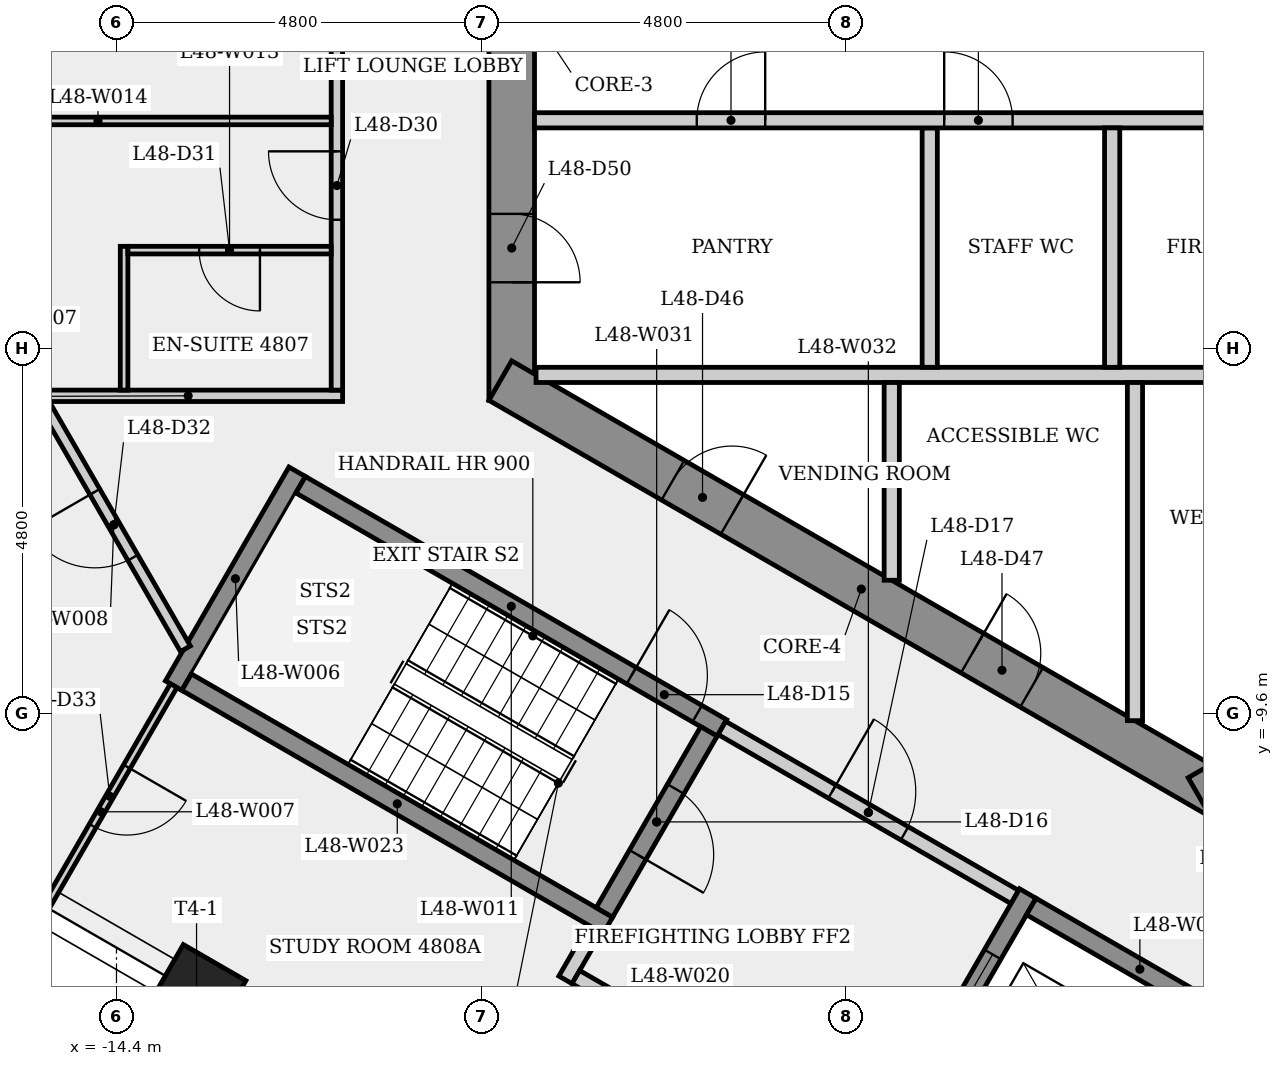
"""IFC4 building model, lengths in metres.
Left out: names, types, materials, properties, quantities, classifications, styles, units other than length and angle.
Written with IfcOpenShell. Run it as: python <this file> out.ifc"""

import sys

from ifc_helpers import new_model, si_unit, direction, frame, frame_2d, origin, origin_2d, place, context, subcontext, project, spatial, rectangle, extrude, element, fill, save


model = new_model("IFC4")
c1 = context("Model", 3, precision=1e-05, world=origin(), true_north=direction((0.0, 1.0)))
c2 = subcontext(c1, "Body", "Model", "MODEL_VIEW")
j1 = project(units=[si_unit("LENGTHUNIT", "METRE"), si_unit("PLANEANGLEUNIT", "RADIAN")], contexts=[c1])
p1 = place(None, origin())
s1 = spatial("IfcSite", under=j1, at=p1, CompositionType="ELEMENT")
p2 = place(p1, origin())
s2 = spatial("IfcBuilding", under=s1, at=p2, CompositionType="ELEMENT")
p3 = place(p2, frame((0.0, 0.0, 179.9)))
s3 = spatial("IfcBuildingStorey", under=s2, at=p3, CompositionType="ELEMENT", Elevation=179.9)
p4 = place(p3, frame((-9.2, 5.485, 0.0), z_axis=(0.0, 0.0, 1.0), x_axis=(0.0, -1.0, 0.0)))
e1 = element("IfcWall", 1, at=p4, inside=s3, PredefinedType="SHEAR", context=c2, shape_type="SweptSolid", body=[
    extrude(rectangle(XDim=10.97, YDim=0.6, at=frame_2d((5.485, 0.0))), origin(), (0.0, 0.0, 1.0), 3.4),
])
p5 = place(p4, frame((8.516, 0.0, 0.0)))
e2 = element("IfcOpeningElement", 2, at=p5, cuts=e1, PredefinedType="OPENING", context=c2, shape_type="SweptSolid", body=[
    extrude(rectangle(XDim=0.9, YDim=2.1, at=frame_2d((0.45, 1.05))), frame((0.0, 0.31, 0.0), z_axis=(0.0, -1.0, 0.0), x_axis=(1.0, 0.0, 0.0)), (0.0, 0.0, 1.0), 0.62),
])
p6 = place(p4, frame((4.685, 0.0, 0.0)))
e3 = element("IfcOpeningElement", 3, at=p6, cuts=e1, PredefinedType="OPENING", context=c2, shape_type="SweptSolid", body=[
    extrude(rectangle(XDim=1.6, YDim=2.1, at=frame_2d((0.8, 1.05))), frame((0.0, 0.31, 0.0), z_axis=(0.0, -1.0, 0.0), x_axis=(1.0, 0.0, 0.0)), (0.0, 0.0, 1.0), 0.62),
])
p7 = place(p3, frame((-9.35, -5.225, 0.0), z_axis=(0.0, 0.0, 1.0), x_axis=(0.866023993627, -0.500002442456, 0.0)))
e4 = element("IfcWall", 4, at=p7, inside=s3, PredefinedType="SHEAR", context=c2, shape_type="SweptSolid", body=[
    extrude(rectangle(XDim=10.97, YDim=0.6, at=frame_2d((5.485, 0.0))), origin(), (0.0, 0.0, 1.0), 3.4),
])
p8 = place(p7, frame((2.622, 0.0, 0.0)))
e5 = element("IfcOpeningElement", 5, at=p8, cuts=e4, PredefinedType="OPENING", context=c2, shape_type="SweptSolid", body=[
    extrude(rectangle(XDim=0.9, YDim=2.1, at=frame_2d((0.45, 1.05))), frame((0.0, 0.31, 0.0), z_axis=(0.0, -1.0, 0.0), x_axis=(1.0, 0.0, 0.0)), (0.0, 0.0, 1.0), 0.62),
])
p9 = place(p7, frame((7.172, 0.0, 0.0)))
e6 = element("IfcOpeningElement", 6, at=p9, cuts=e4, PredefinedType="OPENING", context=c2, shape_type="SweptSolid", body=[
    extrude(rectangle(XDim=0.9, YDim=2.1, at=frame_2d((0.45, 1.05))), frame((0.0, 0.31, 0.0), z_axis=(0.0, -1.0, 0.0), x_axis=(1.0, 0.0, 0.0)), (0.0, 0.0, 1.0), 0.62),
])
p10 = place(p3, frame((-0.15, -10.71, 0.0), z_axis=(0.0, 0.0, 1.0), x_axis=(0.866023993627, 0.500002442456, 0.0)))
e7 = element("IfcWall", 7, at=p10, inside=s3, PredefinedType="SHEAR", context=c2, shape_type="SweptSolid", body=[
    extrude(rectangle(XDim=10.97, YDim=0.6, at=frame_2d((5.485, 0.0))), origin(), (0.0, 0.0, 1.0), 3.4),
])
p11 = place(p10, frame((1.283, 0.0, 0.0)))
e8 = element("IfcOpeningElement", 8, at=p11, cuts=e7, PredefinedType="OPENING", context=c2, shape_type="SweptSolid", body=[
    extrude(rectangle(XDim=0.9, YDim=2.1, at=frame_2d((0.45, 1.05))), frame((0.0, 0.31, 0.0), z_axis=(0.0, -1.0, 0.0), x_axis=(1.0, 0.0, 0.0)), (0.0, 0.0, 1.0), 0.62),
])
p12 = place(p10, frame((8.09, 0.0, 0.0)))
e9 = element("IfcOpeningElement", 9, at=p12, cuts=e7, PredefinedType="OPENING", context=c2, shape_type="SweptSolid", body=[
    extrude(rectangle(XDim=0.9, YDim=2.1, at=frame_2d((0.45, 1.05))), frame((0.0, 0.31, 0.0), z_axis=(0.0, -1.0, 0.0), x_axis=(1.0, 0.0, 0.0)), (0.0, 0.0, 1.0), 0.62),
])
p13 = place(p3, frame((-13.346, -13.294, 0.0), z_axis=(0.0, 0.0, 1.0), x_axis=(-0.5, -0.866025403784, 0.0)))
e10 = element("IfcColumn", 10, at=p13, inside=s3, PredefinedType="COLUMN", context=c2, shape_type="SweptSolid", body=[
    extrude(rectangle(XDim=0.95, YDim=0.95, at=origin_2d()), origin(), (0.0, 0.0, 1.0), 3.4),
])
p14 = place(p3, frame((-15.489, -5.425, 0.0), z_axis=(0.0, 0.0, 1.0), x_axis=(1.0, 0.0, 0.0)))
e11 = element("IfcWall", 11, at=p14, inside=s3, PredefinedType="PARTITIONING", context=c2, shape_type="SweptSolid", body=[
    extrude(rectangle(XDim=4.064, YDim=0.15, at=frame_2d((2.032, 0.0))), origin(), (0.0, 0.0, 1.0), 3.05),
])
p15 = place(p3, frame((-14.3, -3.458, 0.0), z_axis=(0.0, 0.0, 1.0), x_axis=(0.0, -1.0, 0.0)))
e12 = element("IfcWall", 12, at=p15, inside=s3, PredefinedType="PARTITIONING", context=c2, shape_type="SweptSolid", body=[
    extrude(rectangle(XDim=1.892, YDim=0.1, at=frame_2d((0.946, 0.0))), origin(), (0.0, 0.0, 1.0), 3.05),
])
p16 = place(p3, frame((-13.648, -9.239, 0.0), z_axis=(0.0, 0.0, 1.0), x_axis=(0.500017246033, 0.866015446554, 0.0)))
e13 = element("IfcWall", 13, at=p16, inside=s3, PredefinedType="SHEAR", context=c2, shape_type="SweptSolid", body=[
    extrude(rectangle(XDim=3.25, YDim=0.25, at=frame_2d((1.625, 0.0))), origin(), (0.0, 0.0, 1.0), 3.05),
])
p17 = place(p3, frame((-13.648, -9.239, 0.0), z_axis=(0.0, 0.0, 1.0), x_axis=(-0.500044099915, -0.86599994119, 0.0)))
e14 = element("IfcWall", 14, at=p17, inside=s3, PredefinedType="PARTITIONING", context=c2, shape_type="SweptSolid", body=[
    extrude(rectangle(XDim=3.833, YDim=0.1, at=frame_2d((1.917, 0.0))), origin(), (0.0, 0.0, 1.0), 3.05),
])
p18 = place(p17, frame((1.231, 0.0, 0.0)))
e15 = element("IfcOpeningElement", 15, at=p18, cuts=e14, PredefinedType="OPENING", context=c2, shape_type="SweptSolid", body=[
    extrude(rectangle(XDim=0.9, YDim=2.1, at=frame_2d((0.45, 1.05))), frame((0.0, 0.06, 0.0), z_axis=(0.0, -1.0, 0.0), x_axis=(1.0, 0.0, 0.0)), (0.0, 0.0, 1.0), 0.12),
])
p19 = place(p3, frame((-13.493, -8.753, 0.0), z_axis=(0.0, 0.0, 1.0), x_axis=(-0.500006623535, 0.866021579651, 0.0)))
e16 = element("IfcWall", 16, at=p19, inside=s3, PredefinedType="PARTITIONING", context=c2, shape_type="SweptSolid", body=[
    extrude(rectangle(XDim=3.768, YDim=0.15, at=frame_2d((1.884, 0.0))), origin(), (0.0, 0.0, 1.0), 3.05),
])
p20 = place(p19, frame((1.384, 0.0, 0.0)))
e17 = element("IfcOpeningElement", 17, at=p20, cuts=e16, PredefinedType="OPENING", context=c2, shape_type="SweptSolid", body=[
    extrude(rectangle(XDim=1.0, YDim=2.1, at=frame_2d((0.5, 1.05))), frame((0.0, 0.085, 0.0), z_axis=(0.0, -1.0, 0.0), x_axis=(1.0, 0.0, 0.0)), (0.0, 0.0, 1.0), 0.17),
])
p21 = place(p3, frame((-11.977, -6.595, 0.0), z_axis=(0.0, 0.0, 1.0), x_axis=(0.866025499775, -0.499999833739, 0.0)))
e18 = element("IfcWall", 18, at=p21, inside=s3, PredefinedType="SHEAR", context=c2, shape_type="SweptSolid", body=[
    extrude(rectangle(XDim=6.4, YDim=0.25, at=frame_2d((3.2, 0.0))), origin(), (0.0, 0.0, 1.0), 3.05),
])
p22 = place(p21, frame((5.025, 0.0, 0.0)))
e19 = element("IfcOpeningElement", 19, at=p22, cuts=e18, PredefinedType="OPENING", context=c2, shape_type="SweptSolid", body=[
    extrude(rectangle(XDim=1.0, YDim=2.1, at=frame_2d((0.5, 1.05))), frame((0.0, 0.135, 0.0), z_axis=(0.0, -1.0, 0.0), x_axis=(1.0, 0.0, 0.0)), (0.0, 0.0, 1.0), 0.27),
])
p23 = place(p3, frame((-11.5, -5.35, 0.0), z_axis=(0.0, 0.0, 1.0), x_axis=(0.0, 1.0, 0.0)))
e20 = element("IfcWall", 20, at=p23, inside=s3, PredefinedType="PARTITIONING", context=c2, shape_type="SweptSolid", body=[
    extrude(rectangle(XDim=10.85, YDim=0.15, at=frame_2d((5.425, 0.0))), origin(), (0.0, 0.0, 1.0), 3.05),
])
p24 = place(p23, frame((6.659, 0.0, 0.0)))
e21 = element("IfcOpeningElement", 21, at=p24, cuts=e20, PredefinedType="OPENING", context=c2, shape_type="SweptSolid", body=[
    extrude(rectangle(XDim=1.0, YDim=2.1, at=frame_2d((0.5, 1.05))), frame((0.0, 0.085, 0.0), z_axis=(0.0, -1.0, 0.0), x_axis=(1.0, 0.0, 0.0)), (0.0, 0.0, 1.0), 0.17),
])
p25 = place(p23, frame((2.242, 0.0, 0.0)))
e22 = element("IfcOpeningElement", 22, at=p25, cuts=e20, PredefinedType="OPENING", context=c2, shape_type="SweptSolid", body=[
    extrude(rectangle(XDim=0.9, YDim=2.1, at=frame_2d((0.45, 1.05))), frame((0.0, 0.085, 0.0), z_axis=(0.0, -1.0, 0.0), x_axis=(1.0, 0.0, 0.0)), (0.0, 0.0, 1.0), 0.17),
])
p26 = place(p3, frame((-11.575, -3.508, 0.0), z_axis=(0.0, 0.0, 1.0), x_axis=(-1.0, 0.0, 0.0)))
e23 = element("IfcWall", 23, at=p26, inside=s3, PredefinedType="PARTITIONING", context=c2, shape_type="SweptSolid", body=[
    extrude(rectangle(XDim=2.675, YDim=0.1, at=frame_2d((1.337, 0.0))), origin(), (0.0, 0.0, 1.0), 3.05),
])
p27 = place(p26, frame((0.938, 0.0, 0.0)))
e24 = element("IfcOpeningElement", 24, at=p27, cuts=e23, PredefinedType="OPENING", context=c2, shape_type="SweptSolid", body=[
    extrude(rectangle(XDim=0.8, YDim=2.1, at=frame_2d((0.4, 1.05))), frame((0.0, 0.06, 0.0), z_axis=(0.0, -1.0, 0.0), x_axis=(1.0, 0.0, 0.0)), (0.0, 0.0, 1.0), 0.12),
])
p28 = place(p3, frame((-11.575, -1.808, 0.0), z_axis=(0.0, 0.0, 1.0), x_axis=(-1.0, 0.0, 0.0)))
e25 = element("IfcWall", 25, at=p28, inside=s3, PredefinedType="PARTITIONING", context=c2, shape_type="SweptSolid", body=[
    extrude(rectangle(XDim=6.137, YDim=0.1, at=frame_2d((3.068, 0.0))), origin(), (0.0, 0.0, 1.0), 3.05),
])
p29 = place(p3, frame((-8.88, -5.15, 0.0), z_axis=(0.0, 0.0, 1.0), x_axis=(1.0, 0.0, 0.0)))
e26 = element("IfcWall", 26, at=p29, inside=s3, PredefinedType="PARTITIONING", context=c2, shape_type="SweptSolid", body=[
    extrude(rectangle(XDim=11.205, YDim=0.2, at=frame_2d((5.603, 0.0))), origin(), (0.0, 0.0, 1.0), 3.05),
])
p30 = place(p3, frame((-8.493, -13.11, 0.0), z_axis=(0.0, 0.0, 1.0), x_axis=(0.500067724834, 0.865986299303, 0.0)))
e27 = element("IfcWall", 27, at=p30, inside=s3, PredefinedType="PARTITIONING", context=c2, shape_type="SweptSolid", body=[
    extrude(rectangle(XDim=0.775, YDim=0.2, at=frame_2d((0.388, 0.0))), origin(), (0.0, 0.0, 1.0), 3.05),
])
p31 = place(p3, frame((-7.935, -12.393, 0.0), z_axis=(0.0, 0.0, 1.0), x_axis=(-0.866025499775, 0.499999833739, 0.0)))
e28 = element("IfcWall", 28, at=p31, inside=s3, PredefinedType="SHEAR", context=c2, shape_type="SweptSolid", body=[
    extrude(rectangle(XDim=6.4, YDim=0.25, at=frame_2d((3.2, 0.0))), origin(), (0.0, 0.0, 1.0), 3.05),
])
p32 = place(p3, frame((-8.356, -13.073, 0.0), z_axis=(0.0, 0.0, 1.0), x_axis=(0.866038532462, -0.499977259774, 0.0)))
e29 = element("IfcWall", 29, at=p32, inside=s3, PredefinedType="PARTITIONING", context=c2, shape_type="SweptSolid", body=[
    extrude(rectangle(XDim=4.7, YDim=0.2, at=frame_2d((2.35, 0.0))), origin(), (0.0, 0.0, 1.0), 3.05),
])
p33 = place(p3, frame((-6.605, -9.841, 0.0), z_axis=(0.0, 0.0, 1.0), x_axis=(-0.499996545922, -0.866027397988, 0.0)))
e30 = element("IfcWall", 30, at=p33, inside=s3, PredefinedType="SHEAR", context=c2, shape_type="SweptSolid", body=[
    extrude(rectangle(XDim=2.75, YDim=0.25, at=frame_2d((1.375, 0.0))), origin(), (0.0, 0.0, 1.0), 3.05),
])
p34 = place(p33, frame((0.875, 0.0, 0.0)))
e31 = element("IfcOpeningElement", 31, at=p34, cuts=e30, PredefinedType="OPENING", context=c2, shape_type="SweptSolid", body=[
    extrude(rectangle(XDim=1.0, YDim=2.1, at=frame_2d((0.5, 1.05))), frame((0.0, 0.135, 0.0), z_axis=(0.0, -1.0, 0.0), x_axis=(1.0, 0.0, 0.0)), (0.0, 0.0, 1.0), 0.27),
])
p35 = place(p3, frame((-6.435, -9.795, 0.0), z_axis=(0.0, 0.0, 1.0), x_axis=(0.866012907634, -0.500021643343, 0.0)))
e32 = element("IfcWall", 32, at=p35, inside=s3, PredefinedType="PARTITIONING", context=c2, shape_type="SweptSolid", body=[
    extrude(rectangle(XDim=4.45, YDim=0.2, at=frame_2d((2.225, 0.0))), origin(), (0.0, 0.0, 1.0), 3.05),
])
p36 = place(p35, frame((1.675, 0.0, 0.0)))
e33 = element("IfcOpeningElement", 33, at=p36, cuts=e32, PredefinedType="OPENING", context=c2, shape_type="SweptSolid", body=[
    extrude(rectangle(XDim=1.1, YDim=2.1, at=frame_2d((0.55, 1.05))), frame((0.0, 0.11, 0.0), z_axis=(0.0, -1.0, 0.0), x_axis=(1.0, 0.0, 0.0)), (0.0, 0.0, 1.0), 0.22),
])
p37 = place(p3, frame((-4.2, -5.25, 0.0), z_axis=(0.0, 0.0, 1.0), x_axis=(0.0, -1.0, 0.0)))
e34 = element("IfcWall", 34, at=p37, inside=s3, PredefinedType="PARTITIONING", context=c2, shape_type="SweptSolid", body=[
    extrude(rectangle(XDim=2.602, YDim=0.2, at=frame_2d((1.301, 0.0))), origin(), (0.0, 0.0, 1.0), 3.05),
])
p38 = place(p3, frame((-3.7, -1.9, 0.0), z_axis=(0.0, 0.0, 1.0), x_axis=(0.0, -1.0, 0.0)))
e35 = element("IfcWall", 35, at=p38, inside=s3, PredefinedType="PARTITIONING", context=c2, shape_type="SweptSolid", body=[
    extrude(rectangle(XDim=3.15, YDim=0.2, at=frame_2d((1.575, 0.0))), origin(), (0.0, 0.0, 1.0), 3.05),
])
p39 = place(p3, frame((-8.9, -1.8, 0.0), z_axis=(0.0, 0.0, 1.0), x_axis=(1.0, 0.0, 0.0)))
e36 = element("IfcWall", 36, at=p39, inside=s3, PredefinedType="PARTITIONING", context=c2, shape_type="SweptSolid", body=[
    extrude(rectangle(XDim=11.225, YDim=0.2, at=frame_2d((5.613, 0.0))), origin(), (0.0, 0.0, 1.0), 3.05),
])
p40 = place(p39, frame((2.135, 0.0, 0.0)))
e37 = element("IfcOpeningElement", 37, at=p40, cuts=e36, PredefinedType="OPENING", context=c2, shape_type="SweptSolid", body=[
    extrude(rectangle(XDim=0.9, YDim=2.1, at=frame_2d((0.45, 1.05))), frame((0.0, 0.11, 0.0), z_axis=(0.0, -1.0, 0.0), x_axis=(1.0, 0.0, 0.0)), (0.0, 0.0, 1.0), 0.22),
])
p41 = place(p39, frame((5.39, 0.0, 0.0)))
e38 = element("IfcOpeningElement", 38, at=p41, cuts=e36, PredefinedType="OPENING", context=c2, shape_type="SweptSolid", body=[
    extrude(rectangle(XDim=0.9, YDim=2.1, at=frame_2d((0.45, 1.05))), frame((0.0, 0.11, 0.0), z_axis=(0.0, -1.0, 0.0), x_axis=(1.0, 0.0, 0.0)), (0.0, 0.0, 1.0), 0.22),
])
p42 = place(p39, frame((9.613, 0.0, 0.0)))
e39 = element("IfcOpeningElement", 39, at=p42, cuts=e36, PredefinedType="OPENING", context=c2, shape_type="SweptSolid", body=[
    extrude(rectangle(XDim=0.9, YDim=2.1, at=frame_2d((0.45, 1.05))), frame((0.0, 0.11, 0.0), z_axis=(0.0, -1.0, 0.0), x_axis=(1.0, 0.0, 0.0)), (0.0, 0.0, 1.0), 0.22),
])
p43 = place(p3, frame((-2.41, -11.974, 0.0), z_axis=(0.0, 0.0, 1.0), x_axis=(-0.500001826776, -0.866024349092, 0.0)))
e40 = element("IfcWall", 40, at=p43, inside=s3, PredefinedType="SHEAR", context=c2, shape_type="SweptSolid", body=[
    extrude(rectangle(XDim=2.95, YDim=0.25, at=frame_2d((1.475, 0.0))), origin(), (0.0, 0.0, 1.0), 3.05),
])
p44 = place(p43, frame((0.925, 0.0, 0.0)))
e41 = element("IfcOpeningElement", 41, at=p44, cuts=e40, PredefinedType="OPENING", context=c2, shape_type="SweptSolid", body=[
    extrude(rectangle(XDim=1.1, YDim=2.1, at=frame_2d((0.55, 1.05))), frame((0.0, 0.135, 0.0), z_axis=(0.0, -1.0, 0.0), x_axis=(1.0, 0.0, 0.0)), (0.0, 0.0, 1.0), 0.27),
])
p45 = place(p3, frame((-2.364, -12.145, 0.0), z_axis=(0.0, 0.0, 1.0), x_axis=(0.866040211805, -0.499974350878, 0.0)))
e42 = element("IfcWall", 42, at=p45, inside=s3, PredefinedType="SHEAR", context=c2, shape_type="SweptSolid", body=[
    extrude(rectangle(XDim=3.3, YDim=0.25, at=frame_2d((1.65, 0.0))), origin(), (0.0, 0.0, 1.0), 3.05),
])
p46 = place(p3, frame((-1.3, -1.9, 0.0), z_axis=(0.0, 0.0, 1.0), x_axis=(0.0, -1.0, 0.0)))
e43 = element("IfcWall", 43, at=p46, inside=s3, PredefinedType="PARTITIONING", context=c2, shape_type="SweptSolid", body=[
    extrude(rectangle(XDim=3.15, YDim=0.2, at=frame_2d((1.575, 0.0))), origin(), (0.0, 0.0, 1.0), 3.05),
])
p47 = place(p3, frame((-1.0, -5.25, 0.0), z_axis=(0.0, 0.0, 1.0), x_axis=(0.0, -1.0, 0.0)))
e44 = element("IfcWall", 44, at=p47, inside=s3, PredefinedType="PARTITIONING", context=c2, shape_type="SweptSolid", body=[
    extrude(rectangle(XDim=4.449, YDim=0.2, at=frame_2d((2.225, 0.0))), origin(), (0.0, 0.0, 1.0), 3.05),
])
p48 = place(p40, origin())
e45 = element("IfcDoor", 45, at=p48, inside=s3, OperationType="SINGLE_SWING_RIGHT", PredefinedType="DOOR", context=c2, shape_type="SweptSolid", body=[
    extrude(rectangle(XDim=0.9, YDim=2.1, at=frame_2d((0.45, 1.05))), frame((0.0, 0.025, 0.0), z_axis=(0.0, -1.0, 0.0), x_axis=(1.0, 0.0, 0.0)), (0.0, 0.0, 1.0), 0.05),
])
fill(e37, e45)
p49 = place(p41, origin())
e46 = element("IfcDoor", 46, at=p49, inside=s3, OperationType="SINGLE_SWING_LEFT", PredefinedType="DOOR", context=c2, shape_type="SweptSolid", body=[
    extrude(rectangle(XDim=0.9, YDim=2.1, at=frame_2d((0.45, 1.05))), frame((0.0, 0.025, 0.0), z_axis=(0.0, -1.0, 0.0), x_axis=(1.0, 0.0, 0.0)), (0.0, 0.0, 1.0), 0.05),
])
fill(e38, e46)
p50 = place(p22, origin())
e47 = element("IfcDoor", 47, at=p50, inside=s3, OperationType="SINGLE_SWING_LEFT", PredefinedType="DOOR", context=c2, shape_type="SweptSolid", body=[
    extrude(rectangle(XDim=1.0, YDim=2.1, at=frame_2d((0.5, 1.05))), frame((0.0, 0.025, 0.0), z_axis=(0.0, -1.0, 0.0), x_axis=(1.0, 0.0, 0.0)), (0.0, 0.0, 1.0), 0.05),
])
fill(e19, e47)
p51 = place(p34, origin())
e48 = element("IfcDoor", 48, at=p51, inside=s3, OperationType="SINGLE_SWING_RIGHT", PredefinedType="DOOR", context=c2, shape_type="SweptSolid", body=[
    extrude(rectangle(XDim=1.0, YDim=2.1, at=frame_2d((0.5, 1.05))), frame((0.0, 0.025, 0.0), z_axis=(0.0, -1.0, 0.0), x_axis=(1.0, 0.0, 0.0)), (0.0, 0.0, 1.0), 0.05),
])
fill(e31, e48)
p52 = place(p36, origin())
e49 = element("IfcDoor", 49, at=p52, inside=s3, OperationType="SINGLE_SWING_LEFT", PredefinedType="DOOR", context=c2, shape_type="SweptSolid", body=[
    extrude(rectangle(XDim=1.1, YDim=2.1, at=frame_2d((0.55, 1.05))), frame((0.0, 0.025, 0.0), z_axis=(0.0, -1.0, 0.0), x_axis=(1.0, 0.0, 0.0)), (0.0, 0.0, 1.0), 0.05),
])
fill(e33, e49)
p53 = place(p44, origin())
e50 = element("IfcDoor", 50, at=p53, inside=s3, OperationType="SLIDING_TO_LEFT", PredefinedType="DOOR", context=c2, shape_type="SweptSolid", body=[
    extrude(rectangle(XDim=1.1, YDim=2.1, at=frame_2d((0.55, 1.05))), frame((0.0, 0.025, 0.0), z_axis=(0.0, -1.0, 0.0), x_axis=(1.0, 0.0, 0.0)), (0.0, 0.0, 1.0), 0.05),
])
fill(e41, e50)
p54 = place(p25, origin())
e51 = element("IfcDoor", 51, at=p54, inside=s3, OperationType="SINGLE_SWING_RIGHT", PredefinedType="DOOR", context=c2, shape_type="SweptSolid", body=[
    extrude(rectangle(XDim=0.9, YDim=2.1, at=frame_2d((0.45, 1.05))), frame((0.0, 0.025, 0.0), z_axis=(0.0, -1.0, 0.0), x_axis=(1.0, 0.0, 0.0)), (0.0, 0.0, 1.0), 0.05),
])
fill(e22, e51)
p55 = place(p27, origin())
e52 = element("IfcDoor", 52, at=p55, inside=s3, OperationType="SINGLE_SWING_LEFT", PredefinedType="DOOR", context=c2, shape_type="SweptSolid", body=[
    extrude(rectangle(XDim=0.8, YDim=2.1, at=frame_2d((0.4, 1.05))), frame((0.0, 0.025, 0.0), z_axis=(0.0, -1.0, 0.0), x_axis=(1.0, 0.0, 0.0)), (0.0, 0.0, 1.0), 0.05),
])
fill(e24, e52)
p56 = place(p20, origin())
e53 = element("IfcDoor", 53, at=p56, inside=s3, OperationType="SINGLE_SWING_RIGHT", PredefinedType="DOOR", context=c2, shape_type="SweptSolid", body=[
    extrude(rectangle(XDim=1.0, YDim=2.1, at=frame_2d((0.5, 1.05))), frame((0.0, 0.025, 0.0), z_axis=(0.0, -1.0, 0.0), x_axis=(1.0, 0.0, 0.0)), (0.0, 0.0, 1.0), 0.05),
])
fill(e17, e53)
p57 = place(p18, origin())
e54 = element("IfcDoor", 54, at=p57, inside=s3, OperationType="SINGLE_SWING_LEFT", PredefinedType="DOOR", context=c2, shape_type="SweptSolid", body=[
    extrude(rectangle(XDim=0.9, YDim=2.1, at=frame_2d((0.45, 1.05))), frame((0.0, 0.025, 0.0), z_axis=(0.0, -1.0, 0.0), x_axis=(1.0, 0.0, 0.0)), (0.0, 0.0, 1.0), 0.05),
])
fill(e15, e54)
p58 = place(p8, origin())
e55 = element("IfcDoor", 55, at=p58, inside=s3, OperationType="SINGLE_SWING_RIGHT", PredefinedType="DOOR", context=c2, shape_type="SweptSolid", body=[
    extrude(rectangle(XDim=0.9, YDim=2.1, at=frame_2d((0.45, 1.05))), frame((0.0, 0.025, 0.0), z_axis=(0.0, -1.0, 0.0), x_axis=(1.0, 0.0, 0.0)), (0.0, 0.0, 1.0), 0.05),
])
fill(e5, e55)
p59 = place(p9, origin())
e56 = element("IfcDoor", 56, at=p59, inside=s3, OperationType="SINGLE_SWING_LEFT", PredefinedType="DOOR", context=c2, shape_type="SweptSolid", body=[
    extrude(rectangle(XDim=0.9, YDim=2.1, at=frame_2d((0.45, 1.05))), frame((0.0, 0.025, 0.0), z_axis=(0.0, -1.0, 0.0), x_axis=(1.0, 0.0, 0.0)), (0.0, 0.0, 1.0), 0.05),
])
fill(e6, e56)
p60 = place(p5, origin())
e57 = element("IfcDoor", 57, at=p60, inside=s3, OperationType="SINGLE_SWING_RIGHT", PredefinedType="DOOR", context=c2, shape_type="SweptSolid", body=[
    extrude(rectangle(XDim=0.9, YDim=2.1, at=frame_2d((0.45, 1.05))), frame((0.0, 0.025, 0.0), z_axis=(0.0, -1.0, 0.0), x_axis=(1.0, 0.0, 0.0)), (0.0, 0.0, 1.0), 0.05),
])
fill(e2, e57)
save(model, sys.argv[1])
